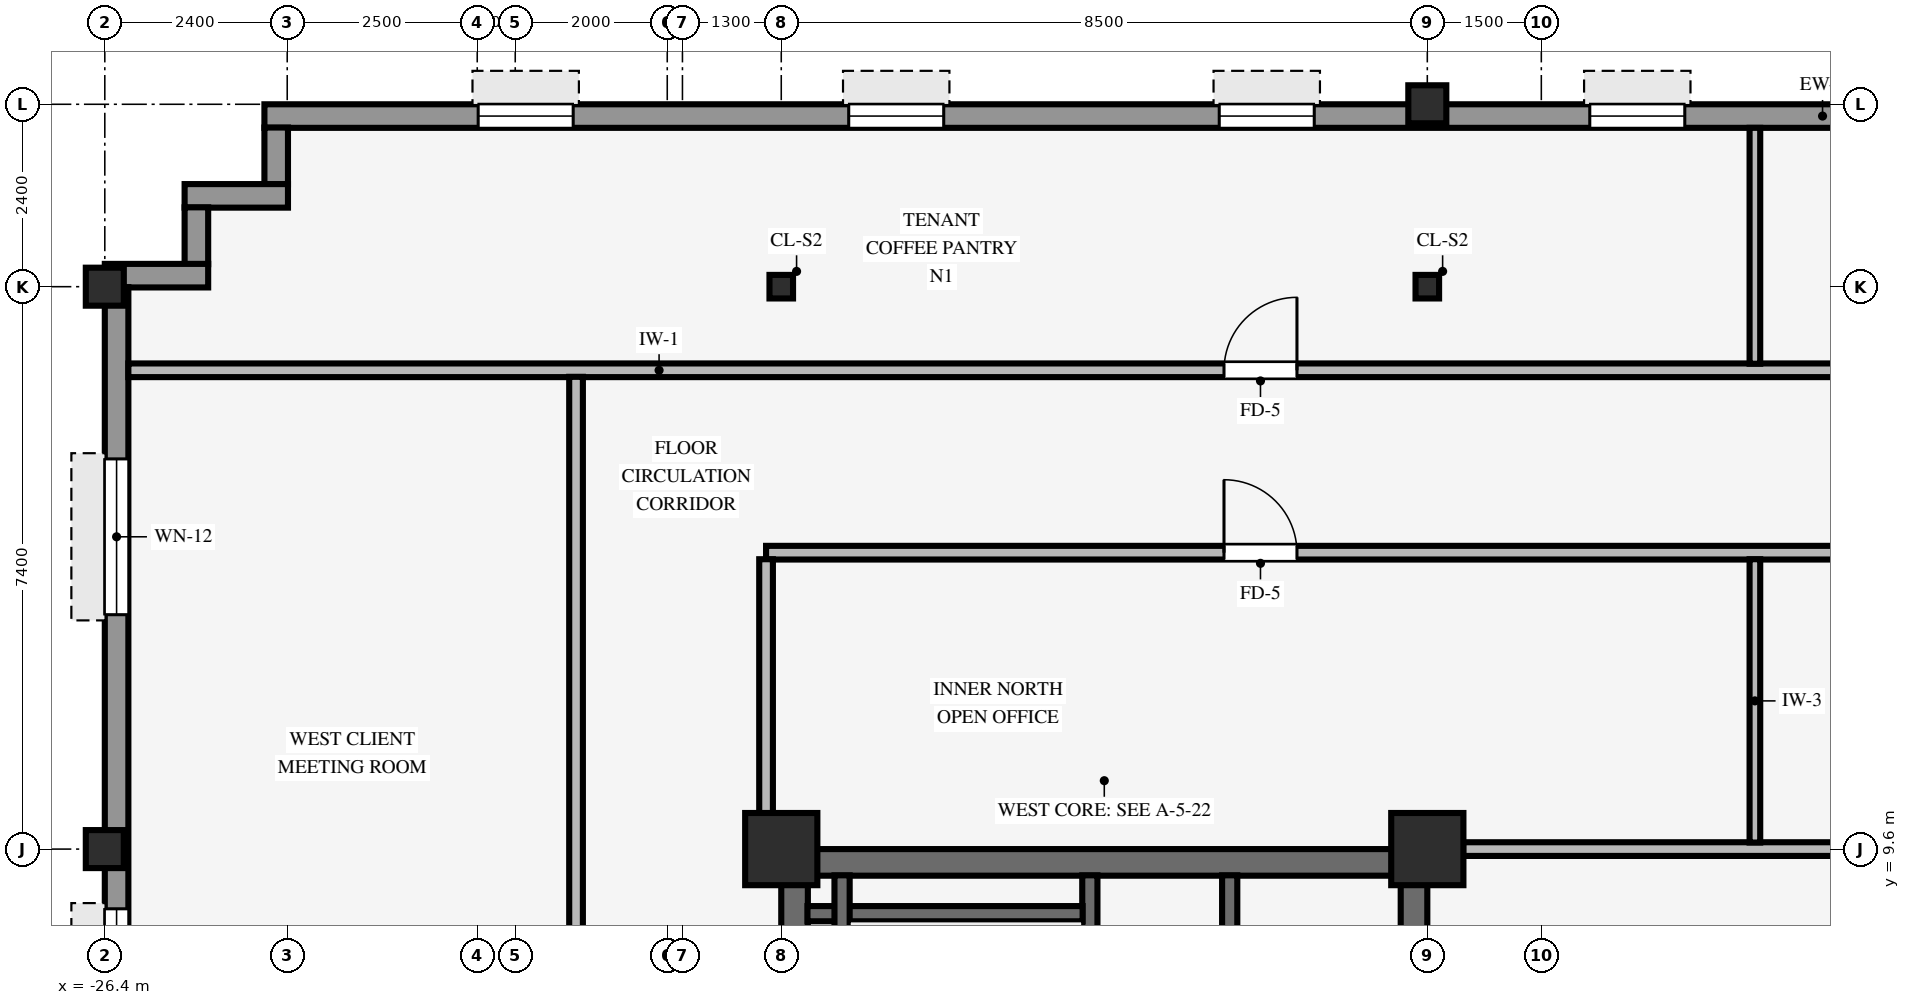
"""IFC4 building model, lengths in metres.
Left out: names, types, materials, properties, quantities, classifications, styles, units other than length and angle.
Written with IfcOpenShell. Run it as: python <this file> out.ifc"""

import sys

from ifc_helpers import new_model, si_unit, direction, frame, frame_2d, origin, origin_2d, place, context, subcontext, project, spatial, rectangle, hollow_rectangle, i_section, extrude, source, transform, mapped, element, fill, save


model = new_model("IFC4")
c1 = context("Model", 3, precision=1e-05, world=origin(), true_north=direction((0.0, 1.0)))
c2 = subcontext(c1, "Body", "Model", "MODEL_VIEW")
j1 = project(units=[si_unit("LENGTHUNIT", "METRE"), si_unit("PLANEANGLEUNIT", "RADIAN")], contexts=[c1])
p1 = place(None, origin())
s1 = spatial("IfcSite", under=j1, at=p1, CompositionType="ELEMENT")
p2 = place(p1, origin())
s2 = spatial("IfcBuilding", under=s1, at=p2, CompositionType="ELEMENT")
p3 = place(p2, frame((0.0, 0.0, 220.1)))
s3 = spatial("IfcBuildingStorey", under=s2, at=p3, CompositionType="ELEMENT", Elevation=220.1)
p4 = place(p3, frame((-17.5, 9.425, 0.0), z_axis=(0.0, 0.0, 1.0), x_axis=(1.0, 0.0, 0.0)))
e1 = element("IfcWall", 1, at=p4, inside=s3, PredefinedType="SHEAR", context=c2, shape_type="SweptSolid", body=[
    extrude(rectangle(XDim=8.5, YDim=0.35, at=frame_2d((4.25, 0.0))), origin(), (0.0, 0.0, 1.0), 3.37),
])
p5 = place(p3, frame((-17.325, -9.255, 0.0), z_axis=(0.0, 0.0, 1.0), x_axis=(0.0, 1.0, 0.0)))
e2 = element("IfcWall", 2, at=p5, inside=s3, PredefinedType="SHEAR", context=c2, shape_type="SweptSolid", body=[
    extrude(rectangle(XDim=18.51, YDim=0.35, at=frame_2d((9.255, 0.0))), origin(), (0.0, 0.0, 1.0), 3.37),
])
p6 = place(p3, frame((-9.175, -9.255, 0.0), z_axis=(0.0, 0.0, 1.0), x_axis=(0.0, 1.0, 0.0)))
e3 = element("IfcWall", 3, at=p6, inside=s3, PredefinedType="SHEAR", context=c2, shape_type="SweptSolid", body=[
    extrude(rectangle(XDim=18.51, YDim=0.35, at=frame_2d((9.255, 0.0))), origin(), (0.0, 0.0, 1.0), 3.37),
])
p7 = place(p6, frame((8.655, 0.0, 0.0)))
e4 = element("IfcOpeningElement", 4, at=p7, cuts=e3, PredefinedType="OPENING", context=c2, shape_type="SweptSolid", body=[
    extrude(rectangle(XDim=1.2, YDim=2.15, at=frame_2d((0.6, 1.075))), frame((0.0, 0.185, 0.0), z_axis=(0.0, -1.0, 0.0), x_axis=(1.0, 0.0, 0.0)), (0.0, 0.0, 1.0), 0.37),
])
for number, where, z_axis, x_axis in (
    (5, (-17.5, 9.6, 0.0), (0.0, 0.0, 1.0), (1.0, 0.0, 0.0)),
    (6, (-9.0, 9.6, 0.0), (0.0, 0.0, 1.0), (1.0, 0.0, 0.0)),
):
    element("IfcColumn", number, at=place(p3, frame(where, z_axis=z_axis, x_axis=x_axis)), inside=s3, PredefinedType="COLUMN", context=c2, shape_type="SweptSolid", body=[
        extrude(rectangle(XDim=0.95, YDim=0.95, at=origin_2d()), origin(), (0.0, 0.0, 1.0), 3.37),
    ])
for number, where, z_axis, x_axis in (
    (7, (-26.4, 9.6, 0.0), (0.0, 0.0, 1.0), (1.0, 0.0, 0.0)),
    (8, (-26.4, 17.0, 0.0), (0.0, 0.0, 1.0), (1.0, 0.0, 0.0)),
    (9, (-9.0, 19.4, 0.0), (0.0, 0.0, 1.0), (1.0, 0.0, 0.0)),
):
    element("IfcColumn", number, at=place(p3, frame(where, z_axis=z_axis, x_axis=x_axis)), inside=s3, PredefinedType="COLUMN", context=c2, shape_type="SweptSolid", body=[
        extrude(hollow_rectangle(XDim=0.5, YDim=0.5, WallThickness=0.032, InnerFilletRadius=0.032, OuterFilletRadius=0.064, at=origin_2d()), origin(), (0.0, 0.0, 1.0), 3.37),
    ])
for number, where, z_axis, x_axis in (
    (10, (-17.5, 17.0, 0.0), (0.0, 0.0, 1.0), (1.0, 0.0, 0.0)),
    (11, (-9.0, 17.0, 0.0), (0.0, 0.0, 1.0), (1.0, 0.0, 0.0)),
):
    element("IfcColumn", number, at=place(p3, frame(where, z_axis=z_axis, x_axis=x_axis)), inside=s3, PredefinedType="COLUMN", context=c2, shape_type="SweptSolid", body=[
        extrude(i_section(OverallWidth=0.31, OverallDepth=0.31, WebThickness=0.015, FlangeThickness=0.015, FilletRadius=0.015, at=origin_2d()), origin(), (0.0, 0.0, 1.0), 3.37),
    ])
p8 = place(p3, frame((-24.3, 19.245, 0.0), z_axis=(0.0, 0.0, 1.0), x_axis=(1.0, 0.0, 0.0)))
e12 = element("IfcWall", 12, at=p8, inside=s3, PredefinedType="STANDARD", context=c2, shape_type="SweptSolid", body=[
    extrude(rectangle(XDim=41.0, YDim=0.31, at=frame_2d((20.5, 0.0))), origin(), (0.0, 0.0, 1.0), 2.705),
])
p9 = place(p8, frame((2.812, 0.0, 0.8)))
e13 = element("IfcOpeningElement", 13, at=p9, cuts=e12, PredefinedType="OPENING", context=c2, shape_type="SweptSolid", body=[
    extrude(rectangle(XDim=1.25, YDim=1.52, at=frame_2d((0.625, 0.76))), frame((0.0, 0.165, 0.0), z_axis=(0.0, -1.0, 0.0), x_axis=(1.0, 0.0, 0.0)), (0.0, 0.0, 1.0), 0.33),
])
p10 = place(p8, frame((7.688, 0.0, 0.8)))
e14 = element("IfcOpeningElement", 14, at=p10, cuts=e12, PredefinedType="OPENING", context=c2, shape_type="SweptSolid", body=[
    extrude(rectangle(XDim=1.25, YDim=1.52, at=frame_2d((0.625, 0.76))), frame((0.0, 0.165, 0.0), z_axis=(0.0, -1.0, 0.0), x_axis=(1.0, 0.0, 0.0)), (0.0, 0.0, 1.0), 0.33),
])
p11 = place(p8, frame((12.562, 0.0, 0.8)))
e15 = element("IfcOpeningElement", 15, at=p11, cuts=e12, PredefinedType="OPENING", context=c2, shape_type="SweptSolid", body=[
    extrude(rectangle(XDim=1.25, YDim=1.52, at=frame_2d((0.625, 0.76))), frame((0.0, 0.165, 0.0), z_axis=(0.0, -1.0, 0.0), x_axis=(1.0, 0.0, 0.0)), (0.0, 0.0, 1.0), 0.33),
])
p12 = place(p8, frame((17.438, 0.0, 0.8)))
e16 = element("IfcOpeningElement", 16, at=p12, cuts=e12, PredefinedType="OPENING", context=c2, shape_type="SweptSolid", body=[
    extrude(rectangle(XDim=1.25, YDim=1.52, at=frame_2d((0.625, 0.76))), frame((0.0, 0.165, 0.0), z_axis=(0.0, -1.0, 0.0), x_axis=(1.0, 0.0, 0.0)), (0.0, 0.0, 1.0), 0.33),
])
p13 = place(p8, frame((22.312, 0.0, 0.8)))
e17 = element("IfcOpeningElement", 17, at=p13, cuts=e12, PredefinedType="OPENING", context=c2, shape_type="SweptSolid", body=[
    extrude(rectangle(XDim=1.25, YDim=1.52, at=frame_2d((0.625, 0.76))), frame((0.0, 0.165, 0.0), z_axis=(0.0, -1.0, 0.0), x_axis=(1.0, 0.0, 0.0)), (0.0, 0.0, 1.0), 0.33),
])
p14 = place(p8, frame((27.188, 0.0, 0.8)))
e18 = element("IfcOpeningElement", 18, at=p14, cuts=e12, PredefinedType="OPENING", context=c2, shape_type="SweptSolid", body=[
    extrude(rectangle(XDim=1.25, YDim=1.52, at=frame_2d((0.625, 0.76))), frame((0.0, 0.165, 0.0), z_axis=(0.0, -1.0, 0.0), x_axis=(1.0, 0.0, 0.0)), (0.0, 0.0, 1.0), 0.33),
])
p15 = place(p8, frame((31.163, 0.0, 0.8)))
e19 = element("IfcOpeningElement", 19, at=p15, cuts=e12, PredefinedType="OPENING", context=c2, shape_type="SweptSolid", body=[
    extrude(rectangle(XDim=1.25, YDim=1.52, at=frame_2d((0.625, 0.76))), frame((0.0, 0.165, 0.0), z_axis=(0.0, -1.0, 0.0), x_axis=(1.0, 0.0, 0.0)), (0.0, 0.0, 1.0), 0.33),
])
p16 = place(p8, frame((36.938, 0.0, 0.8)))
e20 = element("IfcOpeningElement", 20, at=p16, cuts=e12, PredefinedType="OPENING", context=c2, shape_type="SweptSolid", body=[
    extrude(rectangle(XDim=1.25, YDim=1.52, at=frame_2d((0.625, 0.76))), frame((0.0, 0.165, 0.0), z_axis=(0.0, -1.0, 0.0), x_axis=(1.0, 0.0, 0.0)), (0.0, 0.0, 1.0), 0.33),
])
p17 = place(p3, frame((-24.145, 18.346, 0.0), z_axis=(0.0, 0.0, 1.0), x_axis=(0.0, 1.0, 0.0)))
e21 = element("IfcWall", 21, at=p17, inside=s3, PredefinedType="STANDARD", context=c2, shape_type="SweptSolid", body=[
    extrude(rectangle(XDim=0.748, YDim=0.31, at=frame_2d((0.374, 0.0))), origin(), (0.0, 0.0, 1.0), 2.816),
])
p18 = place(p3, frame((-25.35, 18.195, 0.0), z_axis=(0.0, 0.0, 1.0), x_axis=(1.0, 0.0, 0.0)))
e22 = element("IfcWall", 22, at=p18, inside=s3, PredefinedType="STANDARD", context=c2, shape_type="SweptSolid", body=[
    extrude(rectangle(XDim=1.36, YDim=0.31, at=frame_2d((0.68, 0.0))), origin(), (0.0, 0.0, 1.0), 2.816),
])
p19 = place(p3, frame((-25.195, 17.296, 0.0), z_axis=(0.0, 0.0, 1.0), x_axis=(0.0, 1.0, 0.0)))
e23 = element("IfcWall", 23, at=p19, inside=s3, PredefinedType="STANDARD", context=c2, shape_type="SweptSolid", body=[
    extrude(rectangle(XDim=0.748, YDim=0.31, at=frame_2d((0.374, 0.0))), origin(), (0.0, 0.0, 1.0), 2.816),
])
p20 = place(p3, frame((-26.4, 17.145, 0.0), z_axis=(0.0, 0.0, 1.0), x_axis=(1.0, 0.0, 0.0)))
e24 = element("IfcWall", 24, at=p20, inside=s3, PredefinedType="STANDARD", context=c2, shape_type="SweptSolid", body=[
    extrude(rectangle(XDim=1.36, YDim=0.31, at=frame_2d((0.68, 0.0))), origin(), (0.0, 0.0, 1.0), 2.816),
])
p21 = place(p3, frame((-26.245, -16.994, 0.0), z_axis=(0.0, 0.0, 1.0), x_axis=(0.0, 1.0, 0.0)))
e25 = element("IfcWall", 25, at=p21, inside=s3, PredefinedType="STANDARD", context=c2, shape_type="SweptSolid", body=[
    extrude(rectangle(XDim=33.988, YDim=0.31, at=frame_2d((16.994, 0.0))), origin(), (0.0, 0.0, 1.0), 2.705),
])
p22 = place(p21, frame((2.26, 0.0, 0.8)))
e26 = element("IfcOpeningElement", 26, at=p22, cuts=e25, PredefinedType="OPENING", context=c2, shape_type="SweptSolid", body=[
    extrude(rectangle(XDim=2.05, YDim=1.52, at=frame_2d((1.025, 0.76))), frame((0.0, 0.165, 0.0), z_axis=(0.0, -1.0, 0.0), x_axis=(1.0, 0.0, 0.0)), (0.0, 0.0, 1.0), 0.33),
])
p23 = place(p21, frame((8.18, 0.0, 0.8)))
e27 = element("IfcOpeningElement", 27, at=p23, cuts=e25, PredefinedType="OPENING", context=c2, shape_type="SweptSolid", body=[
    extrude(rectangle(XDim=2.05, YDim=1.52, at=frame_2d((1.025, 0.76))), frame((0.0, 0.165, 0.0), z_axis=(0.0, -1.0, 0.0), x_axis=(1.0, 0.0, 0.0)), (0.0, 0.0, 1.0), 0.33),
])
p24 = place(p21, frame((10.949, 0.0, 0.8)))
e28 = element("IfcOpeningElement", 28, at=p24, cuts=e25, PredefinedType="OPENING", context=c2, shape_type="SweptSolid", body=[
    extrude(rectangle(XDim=2.05, YDim=1.52, at=frame_2d((1.025, 0.76))), frame((0.0, 0.165, 0.0), z_axis=(0.0, -1.0, 0.0), x_axis=(1.0, 0.0, 0.0)), (0.0, 0.0, 1.0), 0.33),
])
p25 = place(p21, frame((20.539, 0.0, 0.8)))
e29 = element("IfcOpeningElement", 29, at=p25, cuts=e25, PredefinedType="OPENING", context=c2, shape_type="SweptSolid", body=[
    extrude(rectangle(XDim=2.05, YDim=1.52, at=frame_2d((1.025, 0.76))), frame((0.0, 0.165, 0.0), z_axis=(0.0, -1.0, 0.0), x_axis=(1.0, 0.0, 0.0)), (0.0, 0.0, 1.0), 0.33),
])
p26 = place(p21, frame((23.758, 0.0, 0.8)))
e30 = element("IfcOpeningElement", 30, at=p26, cuts=e25, PredefinedType="OPENING", context=c2, shape_type="SweptSolid", body=[
    extrude(rectangle(XDim=2.05, YDim=1.52, at=frame_2d((1.025, 0.76))), frame((0.0, 0.165, 0.0), z_axis=(0.0, -1.0, 0.0), x_axis=(1.0, 0.0, 0.0)), (0.0, 0.0, 1.0), 0.33),
])
p27 = place(p21, frame((29.678, 0.0, 0.8)))
e31 = element("IfcOpeningElement", 31, at=p27, cuts=e25, PredefinedType="OPENING", context=c2, shape_type="SweptSolid", body=[
    extrude(rectangle(XDim=2.05, YDim=1.52, at=frame_2d((1.025, 0.76))), frame((0.0, 0.165, 0.0), z_axis=(0.0, -1.0, 0.0), x_axis=(1.0, 0.0, 0.0)), (0.0, 0.0, 1.0), 0.33),
])
p28 = place(p3, frame((-13.44, 0.9, 0.0), z_axis=(0.0, 0.0, 1.0), x_axis=(0.0, 1.0, 0.0)))
e32 = element("IfcWall", 32, at=p28, inside=s3, PredefinedType="SHEAR", context=c2, shape_type="SweptSolid", body=[
    extrude(rectangle(XDim=8.355, YDim=0.2, at=frame_2d((4.177, 0.0))), origin(), (0.0, 0.0, 1.0), 3.37),
])
p29 = place(p28, frame((1.53, 0.0, 0.0), z_axis=(0.0, 0.0, 1.0), x_axis=(-1.0, 0.0, 0.0)))
e33 = element("IfcOpeningElement", 33, at=p29, cuts=e32, PredefinedType="OPENING", context=c2, shape_type="SweptSolid", body=[
    extrude(rectangle(XDim=1.1, YDim=2.15, at=frame_2d((0.55, 1.075))), frame((0.0, 0.11, 0.0), z_axis=(0.0, -1.0, 0.0), x_axis=(1.0, 0.0, 0.0)), (0.0, 0.0, 1.0), 0.22),
])
p30 = place(p3, frame((-17.155, 8.75, 0.0), z_axis=(0.0, 0.0, 1.0), x_axis=(1.0, 0.0, 0.0)))
e34 = element("IfcWall", 34, at=p30, inside=s3, PredefinedType="SHEAR", context=c2, shape_type="SweptSolid", body=[
    extrude(rectangle(XDim=3.62, YDim=0.2, at=frame_2d((1.81, 0.0))), origin(), (0.0, 0.0, 1.0), 3.37),
])
p31 = place(p3, frame((-16.7, 1.095, 0.0), z_axis=(0.0, 0.0, 1.0), x_axis=(0.0, 1.0, 0.0)))
e35 = element("IfcWall", 35, at=p31, inside=s3, PredefinedType="SHEAR", context=c2, shape_type="SweptSolid", body=[
    extrude(rectangle(XDim=8.16, YDim=0.2, at=frame_2d((4.08, 0.0))), origin(), (0.0, 0.0, 1.0), 3.37),
])
p32 = place(p3, frame((-11.6, 1.3, 0.0), z_axis=(0.0, 0.0, 1.0), x_axis=(0.0, 1.0, 0.0)))
e36 = element("IfcWall", 36, at=p32, inside=s3, PredefinedType="SHEAR", context=c2, shape_type="SweptSolid", body=[
    extrude(rectangle(XDim=7.955, YDim=0.2, at=frame_2d((3.978, 0.0))), origin(), (0.0, 0.0, 1.0), 3.37),
])
p33 = place(p3, frame((-8.529, 9.6, 0.0), z_axis=(0.0, 0.0, 1.0), x_axis=(1.0, 0.0, 0.0)))
e37 = element("IfcWall", 37, at=p33, inside=s3, PredefinedType="PARTITIONING", context=c2, shape_type="SweptSolid", body=[
    extrude(rectangle(XDim=8.378, YDim=0.18, at=frame_2d((4.189, 0.0))), origin(), (0.0, 0.0, 1.0), 2.405),
])
p34 = place(p3, frame((-17.7, 13.5, 0.0), z_axis=(0.0, 0.0, 1.0), x_axis=(1.0, 0.0, 0.0)))
e38 = element("IfcWall", 38, at=p34, inside=s3, PredefinedType="PARTITIONING", context=c2, shape_type="SweptSolid", body=[
    extrude(rectangle(XDim=24.3, YDim=0.18, at=frame_2d((12.15, 0.0))), origin(), (0.0, 0.0, 1.0), 3.008),
])
p35 = place(p34, frame((6.025, 0.0, 0.0)))
e39 = element("IfcOpeningElement", 39, at=p35, cuts=e38, PredefinedType="OPENING", context=c2, shape_type="SweptSolid", body=[
    extrude(rectangle(XDim=0.96, YDim=2.1, at=frame_2d((0.48, 1.05))), frame((0.0, 0.1, 0.0), z_axis=(0.0, -1.0, 0.0), x_axis=(1.0, 0.0, 0.0)), (0.0, 0.0, 1.0), 0.2),
])
p36 = place(p34, frame((18.175, 0.0, 0.0)))
e40 = element("IfcOpeningElement", 40, at=p36, cuts=e38, PredefinedType="OPENING", context=c2, shape_type="SweptSolid", body=[
    extrude(rectangle(XDim=0.96, YDim=2.1, at=frame_2d((0.48, 1.05))), frame((0.0, 0.1, 0.0), z_axis=(0.0, -1.0, 0.0), x_axis=(1.0, 0.0, 0.0)), (0.0, 0.0, 1.0), 0.2),
])
p37 = place(p3, frame((-26.09, 15.9, 0.0), z_axis=(0.0, 0.0, 1.0), x_axis=(1.0, 0.0, 0.0)))
e41 = element("IfcWall", 41, at=p37, inside=s3, PredefinedType="PARTITIONING", context=c2, shape_type="SweptSolid", body=[
    extrude(rectangle(XDim=35.09, YDim=0.18, at=frame_2d((17.545, 0.0))), origin(), (0.0, 0.0, 1.0), 3.36),
])
p38 = place(p37, frame((14.415, 0.0, 0.0)))
e42 = element("IfcOpeningElement", 42, at=p38, cuts=e41, PredefinedType="OPENING", context=c2, shape_type="SweptSolid", body=[
    extrude(rectangle(XDim=0.96, YDim=2.1, at=frame_2d((0.48, 1.05))), frame((0.0, 0.1, 0.0), z_axis=(0.0, -1.0, 0.0), x_axis=(1.0, 0.0, 0.0)), (0.0, 0.0, 1.0), 0.2),
])
p39 = place(p37, frame((26.565, 0.0, 0.0)))
e43 = element("IfcOpeningElement", 43, at=p39, cuts=e41, PredefinedType="OPENING", context=c2, shape_type="SweptSolid", body=[
    extrude(rectangle(XDim=0.96, YDim=2.1, at=frame_2d((0.48, 1.05))), frame((0.0, 0.1, 0.0), z_axis=(0.0, -1.0, 0.0), x_axis=(1.0, 0.0, 0.0)), (0.0, 0.0, 1.0), 0.2),
])
p40 = place(p3, frame((-20.2, -15.814, 0.0), z_axis=(0.0, 0.0, 1.0), x_axis=(0.0, 1.0, 0.0)))
e44 = element("IfcWall", 44, at=p40, inside=s3, PredefinedType="PARTITIONING", context=c2, shape_type="SweptSolid", body=[
    extrude(rectangle(XDim=31.628, YDim=0.18, at=frame_2d((15.814, 0.0))), origin(), (0.0, 0.0, 1.0), 3.36),
])
p41 = place(p40, frame((20.334, 0.0, 0.0)))
e45 = element("IfcOpeningElement", 45, at=p41, cuts=e44, PredefinedType="OPENING", context=c2, shape_type="SweptSolid", body=[
    extrude(rectangle(XDim=0.96, YDim=2.1, at=frame_2d((0.48, 1.05))), frame((0.0, 0.1, 0.0), z_axis=(0.0, -1.0, 0.0), x_axis=(1.0, 0.0, 0.0)), (0.0, 0.0, 1.0), 0.2),
])
p42 = place(p40, frame((6.834, 0.0, 0.0)))
e46 = element("IfcOpeningElement", 46, at=p42, cuts=e44, PredefinedType="OPENING", context=c2, shape_type="SweptSolid", body=[
    extrude(rectangle(XDim=0.96, YDim=2.1, at=frame_2d((0.48, 1.05))), frame((0.0, 0.1, 0.0), z_axis=(0.0, -1.0, 0.0), x_axis=(1.0, 0.0, 0.0)), (0.0, 0.0, 1.0), 0.2),
])
p43 = place(p3, frame((-17.7, 10.071, 0.0), z_axis=(0.0, 0.0, 1.0), x_axis=(0.0, 1.0, 0.0)))
e47 = element("IfcWall", 47, at=p43, inside=s3, PredefinedType="PARTITIONING", context=c2, shape_type="SweptSolid", body=[
    extrude(rectangle(XDim=3.343, YDim=0.18, at=frame_2d((1.671, 0.0))), origin(), (0.0, 0.0, 1.0), 2.816),
])
p44 = place(p3, frame((-4.69, 9.686, 0.0), z_axis=(0.0, 0.0, 1.0), x_axis=(0.0, 1.0, 0.0)))
e48 = element("IfcWall", 48, at=p44, inside=s3, PredefinedType="PARTITIONING", context=c2, shape_type="SweptSolid", body=[
    extrude(rectangle(XDim=3.728, YDim=0.14, at=frame_2d((1.864, 0.0))), origin(), (0.0, 0.0, 1.0), 3.36),
])
p45 = place(p3, frame((-4.69, 15.986, 0.0), z_axis=(0.0, 0.0, 1.0), x_axis=(0.0, 1.0, 0.0)))
e49 = element("IfcWall", 49, at=p45, inside=s3, PredefinedType="PARTITIONING", context=c2, shape_type="SweptSolid", body=[
    extrude(rectangle(XDim=3.104, YDim=0.14, at=frame_2d((1.552, 0.0))), origin(), (0.0, 0.0, 1.0), 3.36),
])
m1 = source(origin(), c2, "Body", "SweptSolid", [
    extrude(rectangle(XDim=1.25, YDim=1.52, at=frame_2d((0.625, 0.76))), frame((0.0, 0.03, 0.0), z_axis=(0.0, -1.0, 0.0), x_axis=(1.0, 0.0, 0.0)), (0.0, 0.0, 1.0), 0.06),
])
p46 = place(p9, origin())
e50 = element("IfcWindow", 50, at=p46, inside=s3, PartitioningType="SINGLE_PANEL", PredefinedType="WINDOW", context=c2, shape_type="MappedRepresentation", body=[
    mapped(m1, transform((0.0, 0.0, 0.0), scale=1.0)),
])
fill(e13, e50)
p47 = place(p10, origin())
e51 = element("IfcWindow", 51, at=p47, inside=s3, PartitioningType="SINGLE_PANEL", PredefinedType="WINDOW", context=c2, shape_type="MappedRepresentation", body=[
    mapped(m1, transform((0.0, 0.0, 0.0), scale=1.0)),
])
fill(e14, e51)
p48 = place(p11, origin())
e52 = element("IfcWindow", 52, at=p48, inside=s3, PartitioningType="SINGLE_PANEL", PredefinedType="WINDOW", context=c2, shape_type="MappedRepresentation", body=[
    mapped(m1, transform((0.0, 0.0, 0.0), scale=1.0)),
])
fill(e15, e52)
p49 = place(p12, origin())
e53 = element("IfcWindow", 53, at=p49, inside=s3, PartitioningType="SINGLE_PANEL", PredefinedType="WINDOW", context=c2, shape_type="MappedRepresentation", body=[
    mapped(m1, transform((0.0, 0.0, 0.0), scale=1.0)),
])
fill(e16, e53)
m2 = source(origin(), c2, "Body", "SweptSolid", [
    extrude(rectangle(XDim=2.05, YDim=1.52, at=frame_2d((1.025, 0.76))), frame((0.0, 0.03, 0.0), z_axis=(0.0, -1.0, 0.0), x_axis=(1.0, 0.0, 0.0)), (0.0, 0.0, 1.0), 0.06),
])
p50 = place(p26, origin())
e54 = element("IfcWindow", 54, at=p50, inside=s3, PartitioningType="SINGLE_PANEL", PredefinedType="WINDOW", context=c2, shape_type="MappedRepresentation", body=[
    mapped(m2, transform((0.0, 0.0, 0.0), scale=1.0)),
])
fill(e30, e54)
p51 = place(p27, origin())
e55 = element("IfcWindow", 55, at=p51, inside=s3, PartitioningType="SINGLE_PANEL", PredefinedType="WINDOW", context=c2, shape_type="MappedRepresentation", body=[
    mapped(m2, transform((0.0, 0.0, 0.0), scale=1.0)),
])
fill(e31, e55)
m3 = source(origin(), c2, "Body", "SweptSolid", [
    extrude(rectangle(XDim=0.96, YDim=2.1, at=frame_2d((0.48, 1.05))), frame((0.0, 0.025, 0.0), z_axis=(0.0, -1.0, 0.0), x_axis=(1.0, 0.0, 0.0)), (0.0, 0.0, 1.0), 0.05),
])
p52 = place(p38, origin())
e56 = element("IfcDoor", 56, at=p52, inside=s3, OperationType="SINGLE_SWING_RIGHT", PredefinedType="DOOR", context=c2, shape_type="MappedRepresentation", body=[
    mapped(m3, transform((0.0, 0.0, 0.0), scale=1.0)),
])
fill(e42, e56)
p53 = place(p35, origin())
e57 = element("IfcDoor", 57, at=p53, inside=s3, OperationType="SINGLE_SWING_LEFT", PredefinedType="DOOR", context=c2, shape_type="MappedRepresentation", body=[
    mapped(m3, transform((0.0, 0.0, 0.0), scale=1.0)),
])
fill(e39, e57)
save(model, sys.argv[1])
